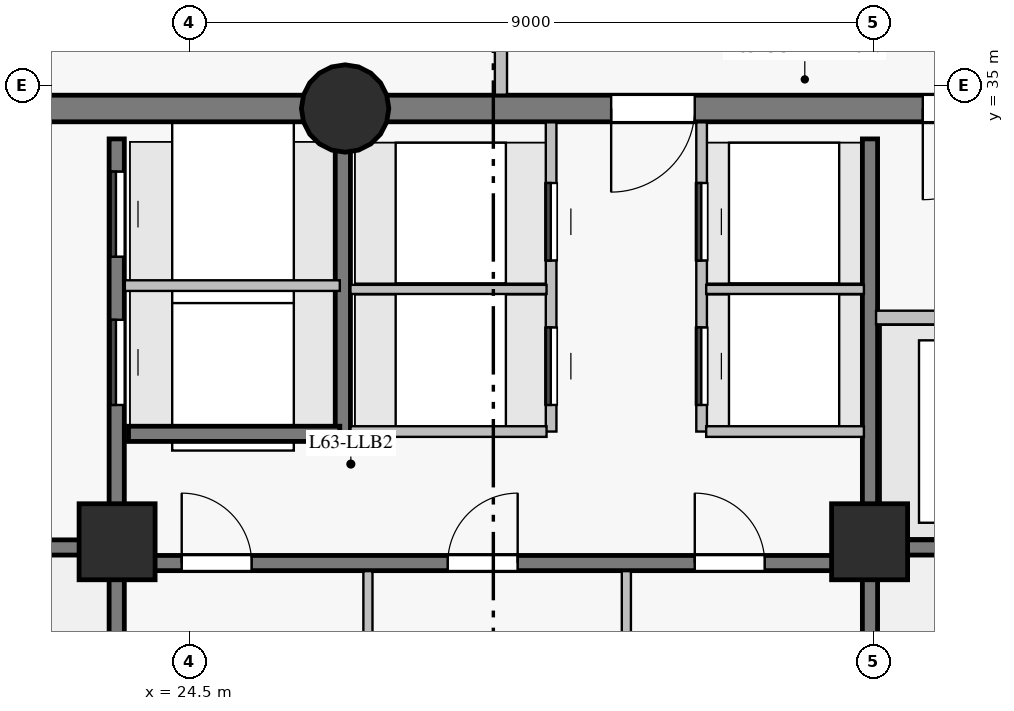
"""IFC4 building model, lengths in metres.
Left out: names, types, materials, properties, quantities, classifications, styles, units other than length and angle.
Written with IfcOpenShell. Run it as: python <this file> out.ifc"""

import sys

from ifc_helpers import new_model, si_unit, direction, frame, frame_2d, origin, origin_with_axes, origin_2d, place, context, subcontext, project, spatial, rectangle, circle, extrude, source, transform, mapped, element, fill, save


model = new_model("IFC4")
c1 = context("Model", 3, precision=1e-05, world=origin(), true_north=direction((0.0, 1.0)))
c2 = subcontext(c1, "Body", "Model", "MODEL_VIEW")
j1 = project(units=[si_unit("LENGTHUNIT", "METRE"), si_unit("PLANEANGLEUNIT", "RADIAN")], contexts=[c1])
p1 = place(None, origin())
s1 = spatial("IfcSite", under=j1, at=p1, CompositionType="ELEMENT")
p2 = place(p1, origin())
s2 = spatial("IfcBuilding", under=s1, at=p2, CompositionType="ELEMENT")
p3 = place(p2, frame((0.0, 0.0, 216.9)))
s3 = spatial("IfcBuildingStorey", under=s2, at=p3, CompositionType="ELEMENT", Elevation=216.9)
p4 = place(p3, frame((37.5, 34.7, 0.0), z_axis=(0.0, 0.0, 1.0), x_axis=(-1.0, 0.0, 0.0)))
e1 = element("IfcWall", 1, at=p4, inside=s3, PredefinedType="SHEAR", context=c2, shape_type="SweptSolid", body=[
    extrude(rectangle(XDim=10.95, YDim=0.35, at=frame_2d((5.475, 0.0))), origin(), (0.0, 0.0, 1.0), 2.85),
])
p5 = place(p4, frame((2.15, 0.0, 0.0)))
e2 = element("IfcOpeningElement", 2, at=p5, cuts=e1, PredefinedType="OPENING", context=c2, shape_type="SweptSolid", body=[
    extrude(rectangle(XDim=1.2, YDim=2.15, at=frame_2d((0.6, 1.075))), frame((0.0, 0.185, 0.0), z_axis=(0.0, -1.0, 0.0), x_axis=(1.0, 0.0, 0.0)), (0.0, 0.0, 1.0), 0.37),
])
p6 = place(p4, frame((6.35, 0.0, 0.0)))
e3 = element("IfcOpeningElement", 3, at=p6, cuts=e1, PredefinedType="OPENING", context=c2, shape_type="SweptSolid", body=[
    extrude(rectangle(XDim=1.1, YDim=2.15, at=frame_2d((0.55, 1.075))), frame((0.0, 0.185, 0.0), z_axis=(0.0, -1.0, 0.0), x_axis=(1.0, 0.0, 0.0)), (0.0, 0.0, 1.0), 0.37),
])
p7 = place(p3, frame((26.55, 34.7, 0.0), z_axis=(0.0, 0.0, 1.0), x_axis=(-1.0, 0.0, 0.0)))
e4 = element("IfcWall", 4, at=p7, inside=s3, PredefinedType="SHEAR", context=c2, shape_type="SweptSolid", body=[
    extrude(rectangle(XDim=7.05, YDim=0.35, at=frame_2d((3.525, 0.0))), origin(), (0.0, 0.0, 1.0), 2.85),
])
m1 = source(origin_with_axes(), c2, "Body", "SweptSolid", [
    extrude(circle(Radius=0.575, at=origin_2d()), origin(), (0.0, 0.0, 1.0), 3.05),
])
p8 = place(p3, frame((26.55, 34.7, 0.0), z_axis=(0.0, 0.0, 1.0), x_axis=(1.0, 0.0, 0.0)))
e5 = element("IfcColumn", 5, at=p8, inside=s3, PredefinedType="COLUMN", context=c2, shape_type="MappedRepresentation", body=[
    mapped(m1, transform((0.0, 0.0, 0.0), scale=1.0)),
])
m2 = source(origin_with_axes(), c2, "Body", "SweptSolid", [
    extrude(rectangle(XDim=1.0, YDim=1.0, at=origin_2d()), origin(), (0.0, 0.0, 1.0), 3.05),
])
for number, where, z_axis, x_axis in (
    (6, (23.55, 29.0, 0.0), (0.0, 0.0, 1.0), (1.0, 0.0, 0.0)),
    (7, (33.45, 29.0, 0.0), (0.0, 0.0, 1.0), (1.0, 0.0, 0.0)),
):
    element("IfcColumn", number, at=place(p3, frame(where, z_axis=z_axis, x_axis=x_axis)), inside=s3, PredefinedType="COLUMN", context=c2, shape_type="MappedRepresentation", body=[
        mapped(m2, transform((0.0, 0.0, 0.0), scale=1.0)),
    ])
p9 = place(p3, frame((23.545, 18.7, 0.0), z_axis=(0.0, 0.0, 1.0), x_axis=(0.0, 1.0, 0.0)))
e8 = element("IfcWall", 8, at=p9, inside=s3, PredefinedType="SHEAR", context=c2, shape_type="SweptSolid", body=[
    extrude(rectangle(XDim=15.6, YDim=0.2, at=frame_2d((7.8, 0.0))), origin(), (0.0, 0.0, 1.0), 2.85),
])
p10 = place(p9, frame((2.75, 0.0, 0.0)))
e9 = element("IfcOpeningElement", 9, at=p10, cuts=e8, PredefinedType="OPENING", context=c2, shape_type="SweptSolid", body=[
    extrude(rectangle(XDim=1.15, YDim=2.15, at=frame_2d((0.575, 1.075))), frame((0.0, 0.11, 0.0), z_axis=(0.0, -1.0, 0.0), x_axis=(1.0, 0.0, 0.0)), (0.0, 0.0, 1.0), 0.22),
])
p11 = place(p9, frame((0.14, 0.0, 0.0)))
e10 = element("IfcOpeningElement", 10, at=p11, cuts=e8, PredefinedType="OPENING", context=c2, shape_type="SweptSolid", body=[
    extrude(rectangle(XDim=0.88, YDim=2.1, at=frame_2d((0.44, 1.05))), frame((0.0, 0.11, 0.0), z_axis=(0.0, -1.0, 0.0), x_axis=(1.0, 0.0, 0.0)), (0.0, 0.0, 1.0), 0.22),
])
p12 = place(p9, frame((1.36, 0.0, 0.0)))
e11 = element("IfcOpeningElement", 11, at=p12, cuts=e8, PredefinedType="OPENING", context=c2, shape_type="SweptSolid", body=[
    extrude(rectangle(XDim=0.88, YDim=2.1, at=frame_2d((0.44, 1.05))), frame((0.0, 0.11, 0.0), z_axis=(0.0, -1.0, 0.0), x_axis=(1.0, 0.0, 0.0)), (0.0, 0.0, 1.0), 0.22),
])
p13 = place(p9, frame((12.1, 0.0, 0.0)))
e12 = element("IfcOpeningElement", 12, at=p13, cuts=e8, PredefinedType="OPENING", context=c2, shape_type="SweptSolid", body=[
    extrude(rectangle(XDim=1.12, YDim=2.15, at=frame_2d((0.56, 1.075))), frame((0.0, 0.11, 0.0), z_axis=(0.0, -1.0, 0.0), x_axis=(1.0, 0.0, 0.0)), (0.0, 0.0, 1.0), 0.22),
])
p14 = place(p9, frame((14.05, 0.0, 0.0)))
e13 = element("IfcOpeningElement", 13, at=p14, cuts=e8, PredefinedType="OPENING", context=c2, shape_type="SweptSolid", body=[
    extrude(rectangle(XDim=1.12, YDim=2.15, at=frame_2d((0.56, 1.075))), frame((0.0, 0.11, 0.0), z_axis=(0.0, -1.0, 0.0), x_axis=(1.0, 0.0, 0.0)), (0.0, 0.0, 1.0), 0.22),
])
p15 = place(p3, frame((33.455, 18.7, 0.0), z_axis=(0.0, 0.0, 1.0), x_axis=(0.0, 1.0, 0.0)))
e14 = element("IfcWall", 14, at=p15, inside=s3, PredefinedType="SHEAR", context=c2, shape_type="SweptSolid", body=[
    extrude(rectangle(XDim=15.6, YDim=0.2, at=frame_2d((7.8, 0.0))), origin(), (0.0, 0.0, 1.0), 2.85),
])
p16 = place(p15, frame((2.75, 0.0, 0.0)))
e15 = element("IfcOpeningElement", 15, at=p16, cuts=e14, PredefinedType="OPENING", context=c2, shape_type="SweptSolid", body=[
    extrude(rectangle(XDim=1.15, YDim=2.15, at=frame_2d((0.575, 1.075))), frame((0.0, 0.11, 0.0), z_axis=(0.0, -1.0, 0.0), x_axis=(1.0, 0.0, 0.0)), (0.0, 0.0, 1.0), 0.22),
])
p17 = place(p15, frame((0.55, 0.0, 0.0)))
e16 = element("IfcOpeningElement", 16, at=p17, cuts=e14, PredefinedType="OPENING", context=c2, shape_type="SweptSolid", body=[
    extrude(rectangle(XDim=0.94, YDim=2.1, at=frame_2d((0.47, 1.05))), frame((0.0, 0.11, 0.0), z_axis=(0.0, -1.0, 0.0), x_axis=(1.0, 0.0, 0.0)), (0.0, 0.0, 1.0), 0.22),
])
p18 = place(p3, frame((23.7, 28.72, 0.0), z_axis=(0.0, 0.0, 1.0), x_axis=(1.0, 0.0, 0.0)))
e17 = element("IfcWall", 17, at=p18, inside=s3, PredefinedType="SHEAR", context=c2, shape_type="SweptSolid", body=[
    extrude(rectangle(XDim=9.6, YDim=0.2, at=frame_2d((4.8, 0.0))), origin(), (0.0, 0.0, 1.0), 2.85),
])
p19 = place(p18, frame((0.7, 0.0, 0.0)))
e18 = element("IfcOpeningElement", 18, at=p19, cuts=e17, PredefinedType="OPENING", context=c2, shape_type="SweptSolid", body=[
    extrude(rectangle(XDim=0.92, YDim=2.1, at=frame_2d((0.46, 1.05))), frame((0.0, 0.11, 0.0), z_axis=(0.0, -1.0, 0.0), x_axis=(1.0, 0.0, 0.0)), (0.0, 0.0, 1.0), 0.22),
])
p20 = place(p18, frame((4.2, 0.0, 0.0)))
e19 = element("IfcOpeningElement", 19, at=p20, cuts=e17, PredefinedType="OPENING", context=c2, shape_type="SweptSolid", body=[
    extrude(rectangle(XDim=0.92, YDim=2.1, at=frame_2d((0.46, 1.05))), frame((0.0, 0.11, 0.0), z_axis=(0.0, -1.0, 0.0), x_axis=(1.0, 0.0, 0.0)), (0.0, 0.0, 1.0), 0.22),
])
p21 = place(p18, frame((7.45, 0.0, 0.0)))
e20 = element("IfcOpeningElement", 20, at=p21, cuts=e17, PredefinedType="OPENING", context=c2, shape_type="SweptSolid", body=[
    extrude(rectangle(XDim=0.92, YDim=2.1, at=frame_2d((0.46, 1.05))), frame((0.0, 0.11, 0.0), z_axis=(0.0, -1.0, 0.0), x_axis=(1.0, 0.0, 0.0)), (0.0, 0.0, 1.0), 0.22),
])
for number, where, z_axis, x_axis in (
    (21, (33.455, 28.925, 0.0), (0.0, 0.0, 1.0), (1.0, 0.0, 0.0)),
    (22, (19.55, 28.925, 0.0), (0.0, 0.0, 1.0), (1.0, 0.0, 0.0)),
):
    element("IfcWall", number, at=place(p3, frame(where, z_axis=z_axis, x_axis=x_axis)), inside=s3, PredefinedType="SHEAR", context=c2, shape_type="SweptSolid", body=[
        extrude(rectangle(XDim=3.995, YDim=0.2, at=frame_2d((1.998, 0.0))), origin(), (0.0, 0.0, 1.0), 2.85),
    ])
p22 = place(p3, frame((26.52, 30.42, 0.0), z_axis=(0.0, 0.0, 1.0), x_axis=(0.0, 1.0, 0.0)))
e23 = element("IfcWall", 23, at=p22, inside=s3, PredefinedType="SHEAR", context=c2, shape_type="SweptSolid", body=[
    extrude(rectangle(XDim=3.86, YDim=0.2, at=frame_2d((1.93, 0.0))), origin(), (0.0, 0.0, 1.0), 2.85),
])
p23 = place(p3, frame((23.7, 30.42, 0.0), z_axis=(0.0, 0.0, 1.0), x_axis=(1.0, 0.0, 0.0)))
e24 = element("IfcWall", 24, at=p23, inside=s3, PredefinedType="SHEAR", context=c2, shape_type="SweptSolid", body=[
    extrude(rectangle(XDim=2.78, YDim=0.2, at=frame_2d((1.39, 0.0))), origin(), (0.0, 0.0, 1.0), 2.85),
])
p24 = place(p3, frame((29.26, 30.45, 0.0), z_axis=(0.0, 0.0, 1.0), x_axis=(0.0, 1.0, 0.0)))
e25 = element("IfcWall", 25, at=p24, inside=s3, PredefinedType="PARTITIONING", context=c2, shape_type="SweptSolid", body=[
    extrude(rectangle(XDim=4.068, YDim=0.14, at=frame_2d((2.034, 0.0))), origin(), (0.0, 0.0, 1.0), 2.85),
])
p25 = place(p24, frame((0.35, 0.0, 0.0)))
e26 = element("IfcOpeningElement", 26, at=p25, cuts=e25, PredefinedType="OPENING", context=c2, shape_type="SweptSolid", body=[
    extrude(rectangle(XDim=1.02, YDim=2.15, at=frame_2d((0.51, 1.075))), frame((0.0, 0.08, 0.0), z_axis=(0.0, -1.0, 0.0), x_axis=(1.0, 0.0, 0.0)), (0.0, 0.0, 1.0), 0.16),
])
p26 = place(p24, frame((2.25, 0.0, 0.0)))
e27 = element("IfcOpeningElement", 27, at=p26, cuts=e25, PredefinedType="OPENING", context=c2, shape_type="SweptSolid", body=[
    extrude(rectangle(XDim=1.02, YDim=2.15, at=frame_2d((0.51, 1.075))), frame((0.0, 0.08, 0.0), z_axis=(0.0, -1.0, 0.0), x_axis=(1.0, 0.0, 0.0)), (0.0, 0.0, 1.0), 0.16),
])
p27 = place(p3, frame((31.24, 30.45, 0.0), z_axis=(0.0, 0.0, 1.0), x_axis=(0.0, 1.0, 0.0)))
e28 = element("IfcWall", 28, at=p27, inside=s3, PredefinedType="PARTITIONING", context=c2, shape_type="SweptSolid", body=[
    extrude(rectangle(XDim=4.068, YDim=0.14, at=frame_2d((2.034, 0.0))), origin(), (0.0, 0.0, 1.0), 2.85),
])
p28 = place(p27, frame((0.35, 0.0, 0.0)))
e29 = element("IfcOpeningElement", 29, at=p28, cuts=e28, PredefinedType="OPENING", context=c2, shape_type="SweptSolid", body=[
    extrude(rectangle(XDim=1.02, YDim=2.15, at=frame_2d((0.51, 1.075))), frame((0.0, 0.08, 0.0), z_axis=(0.0, -1.0, 0.0), x_axis=(1.0, 0.0, 0.0)), (0.0, 0.0, 1.0), 0.16),
])
p29 = place(p27, frame((2.25, 0.0, 0.0)))
e30 = element("IfcOpeningElement", 30, at=p29, cuts=e28, PredefinedType="OPENING", context=c2, shape_type="SweptSolid", body=[
    extrude(rectangle(XDim=1.02, YDim=2.15, at=frame_2d((0.51, 1.075))), frame((0.0, 0.08, 0.0), z_axis=(0.0, -1.0, 0.0), x_axis=(1.0, 0.0, 0.0)), (0.0, 0.0, 1.0), 0.16),
])
p30 = place(p3, frame((33.535, 31.95, 0.0), z_axis=(0.0, 0.0, 1.0), x_axis=(1.0, 0.0, 0.0)))
e31 = element("IfcWall", 31, at=p30, inside=s3, PredefinedType="PARTITIONING", context=c2, shape_type="SweptSolid", body=[
    extrude(rectangle(XDim=3.784, YDim=0.18, at=frame_2d((1.892, 0.0))), origin(), (0.0, 0.0, 1.0), 2.85),
])
p31 = place(p30, frame((0.9, 0.0, 0.0)))
e32 = element("IfcOpeningElement", 32, at=p31, cuts=e31, PredefinedType="OPENING", context=c2, shape_type="SweptSolid", body=[
    extrude(rectangle(XDim=1.3, YDim=2.2, at=frame_2d((0.65, 1.1))), frame((0.0, 0.1, 0.0), z_axis=(0.0, -1.0, 0.0), x_axis=(1.0, 0.0, 0.0)), (0.0, 0.0, 1.0), 0.2),
])
p32 = place(p3, frame((23.652, 32.37, 0.0), z_axis=(0.0, 0.0, 1.0), x_axis=(1.0, 0.0, 0.0)))
e33 = element("IfcWall", 33, at=p32, inside=s3, PredefinedType="PARTITIONING", context=c2, shape_type="SweptSolid", body=[
    extrude(rectangle(XDim=2.828, YDim=0.14, at=frame_2d((1.414, 0.0))), origin(), (0.0, 0.0, 1.0), 2.85),
])
p33 = place(p3, frame((26.62, 30.45, 0.0), z_axis=(0.0, 0.0, 1.0), x_axis=(1.0, 0.0, 0.0)))
e34 = element("IfcWall", 34, at=p33, inside=s3, PredefinedType="PARTITIONING", context=c2, shape_type="SweptSolid", body=[
    extrude(rectangle(XDim=2.58, YDim=0.14, at=frame_2d((1.29, 0.0))), origin(), (0.0, 0.0, 1.0), 2.85),
])
p34 = place(p3, frame((26.62, 32.32, 0.0), z_axis=(0.0, 0.0, 1.0), x_axis=(1.0, 0.0, 0.0)))
e35 = element("IfcWall", 35, at=p34, inside=s3, PredefinedType="PARTITIONING", context=c2, shape_type="SweptSolid", body=[
    extrude(rectangle(XDim=2.58, YDim=0.12, at=frame_2d((1.29, 0.0))), origin(), (0.0, 0.0, 1.0), 2.85),
])
for number, where, z_axis, x_axis in (
    (36, (26.85, 26.027, 0.0), (0.0, 0.0, 1.0), (0.0, 1.0, 0.0)),
    (37, (30.25, 26.027, 0.0), (0.0, 0.0, 1.0), (0.0, 1.0, 0.0)),
):
    element("IfcWall", number, at=place(p3, frame(where, z_axis=z_axis, x_axis=x_axis)), inside=s3, PredefinedType="PARTITIONING", context=c2, shape_type="SweptSolid", body=[
        extrude(rectangle(XDim=2.587, YDim=0.12, at=frame_2d((1.293, 0.0))), origin(), (0.0, 0.0, 1.0), 2.85),
    ])
p35 = place(p3, frame((31.3, 30.45, 0.0), z_axis=(0.0, 0.0, 1.0), x_axis=(1.0, 0.0, 0.0)))
e38 = element("IfcWall", 38, at=p35, inside=s3, PredefinedType="PARTITIONING", context=c2, shape_type="SweptSolid", body=[
    extrude(rectangle(XDim=2.075, YDim=0.14, at=frame_2d((1.038, 0.0))), origin(), (0.0, 0.0, 1.0), 2.85),
])
p36 = place(p3, frame((31.3, 32.32, 0.0), z_axis=(0.0, 0.0, 1.0), x_axis=(1.0, 0.0, 0.0)))
e39 = element("IfcWall", 39, at=p36, inside=s3, PredefinedType="PARTITIONING", context=c2, shape_type="SweptSolid", body=[
    extrude(rectangle(XDim=2.075, YDim=0.12, at=frame_2d((1.038, 0.0))), origin(), (0.0, 0.0, 1.0), 2.85),
])
p37 = place(p3, frame((28.6, 34.882, 0.0), z_axis=(0.0, 0.0, 1.0), x_axis=(0.0, 1.0, 0.0)))
e40 = element("IfcWall", 40, at=p37, inside=s3, PredefinedType="PARTITIONING", context=c2, shape_type="SweptSolid", body=[
    extrude(rectangle(XDim=1.518, YDim=0.16, at=frame_2d((0.759, 0.0))), origin(), (0.0, 0.0, 1.0), 2.85),
])
m3 = source(origin_with_axes(), c2, "Body", "SweptSolid", [
    extrude(rectangle(XDim=1.2, YDim=2.15, at=frame_2d((0.6, 1.075))), frame((0.0, 0.025, 0.0), z_axis=(0.0, -1.0, 0.0), x_axis=(1.0, 0.0, 0.0)), (0.0, 0.0, 1.0), 0.05),
])
p38 = place(p5, origin())
e41 = element("IfcDoor", 41, at=p38, inside=s3, OperationType="SINGLE_SWING_RIGHT", PredefinedType="DOOR", context=c2, shape_type="MappedRepresentation", body=[
    mapped(m3, transform((0.0, 0.0, 0.0), scale=1.0)),
])
fill(e2, e41)
m4 = source(origin_with_axes(), c2, "Body", "SweptSolid", [
    extrude(rectangle(XDim=0.92, YDim=2.1, at=frame_2d((0.46, 1.05))), frame((0.0, 0.025, 0.0), z_axis=(0.0, -1.0, 0.0), x_axis=(1.0, 0.0, 0.0)), (0.0, 0.0, 1.0), 0.05),
])
p39 = place(p19, origin())
e42 = element("IfcDoor", 42, at=p39, inside=s3, OperationType="SINGLE_SWING_LEFT", PredefinedType="DOOR", context=c2, shape_type="MappedRepresentation", body=[
    mapped(m4, transform((0.0, 0.0, 0.0), scale=1.0)),
])
fill(e18, e42)
p40 = place(p20, origin())
e43 = element("IfcDoor", 43, at=p40, inside=s3, OperationType="SINGLE_SWING_RIGHT", PredefinedType="DOOR", context=c2, shape_type="MappedRepresentation", body=[
    mapped(m4, transform((0.0, 0.0, 0.0), scale=1.0)),
])
fill(e19, e43)
p41 = place(p21, origin())
e44 = element("IfcDoor", 44, at=p41, inside=s3, OperationType="SINGLE_SWING_LEFT", PredefinedType="DOOR", context=c2, shape_type="MappedRepresentation", body=[
    mapped(m4, transform((0.0, 0.0, 0.0), scale=1.0)),
])
fill(e20, e44)
m5 = source(origin_with_axes(), c2, "Body", "SweptSolid", [
    extrude(rectangle(XDim=1.1, YDim=2.15, at=frame_2d((0.55, 1.075))), frame((0.0, 0.025, 0.0), z_axis=(0.0, -1.0, 0.0), x_axis=(1.0, 0.0, 0.0)), (0.0, 0.0, 1.0), 0.05),
])
p42 = place(p6, origin())
e45 = element("IfcDoor", 45, at=p42, inside=s3, OperationType="SINGLE_SWING_RIGHT", PredefinedType="DOOR", context=c2, shape_type="MappedRepresentation", body=[
    mapped(m5, transform((0.0, 0.0, 0.0), scale=1.0)),
])
fill(e3, e45)
m6 = source(origin_with_axes(), c2, "Body", "SweptSolid", [
    extrude(rectangle(XDim=1.12, YDim=2.15, at=frame_2d((0.56, 1.075))), frame((0.0, 0.025, 0.0), z_axis=(0.0, -1.0, 0.0), x_axis=(1.0, 0.0, 0.0)), (0.0, 0.0, 1.0), 0.05),
])
p43 = place(p13, origin())
e46 = element("IfcDoor", 46, at=p43, inside=s3, OperationType="SLIDING_TO_LEFT", PredefinedType="DOOR", context=c2, shape_type="MappedRepresentation", body=[
    mapped(m6, transform((0.0, 0.0, 0.0), scale=1.0)),
])
fill(e12, e46)
p44 = place(p14, origin())
e47 = element("IfcDoor", 47, at=p44, inside=s3, OperationType="SLIDING_TO_RIGHT", PredefinedType="DOOR", context=c2, shape_type="MappedRepresentation", body=[
    mapped(m6, transform((0.0, 0.0, 0.0), scale=1.0)),
])
fill(e13, e47)
m7 = source(origin_with_axes(), c2, "Body", "SweptSolid", [
    extrude(rectangle(XDim=1.02, YDim=2.15, at=frame_2d((0.51, 1.075))), frame((0.0, 0.025, 0.0), z_axis=(0.0, -1.0, 0.0), x_axis=(1.0, 0.0, 0.0)), (0.0, 0.0, 1.0), 0.05),
])
p45 = place(p25, origin())
e48 = element("IfcDoor", 48, at=p45, inside=s3, OperationType="SLIDING_TO_LEFT", PredefinedType="DOOR", context=c2, shape_type="MappedRepresentation", body=[
    mapped(m7, transform((0.0, 0.0, 0.0), scale=1.0)),
])
fill(e26, e48)
p46 = place(p26, origin())
e49 = element("IfcDoor", 49, at=p46, inside=s3, OperationType="SLIDING_TO_LEFT", PredefinedType="DOOR", context=c2, shape_type="MappedRepresentation", body=[
    mapped(m7, transform((0.0, 0.0, 0.0), scale=1.0)),
])
fill(e27, e49)
p47 = place(p28, origin())
e50 = element("IfcDoor", 50, at=p47, inside=s3, OperationType="SLIDING_TO_LEFT", PredefinedType="DOOR", context=c2, shape_type="MappedRepresentation", body=[
    mapped(m7, transform((0.0, 0.0, 0.0), scale=1.0)),
])
fill(e29, e50)
p48 = place(p29, origin())
e51 = element("IfcDoor", 51, at=p48, inside=s3, OperationType="SLIDING_TO_LEFT", PredefinedType="DOOR", context=c2, shape_type="MappedRepresentation", body=[
    mapped(m7, transform((0.0, 0.0, 0.0), scale=1.0)),
])
fill(e30, e51)
save(model, sys.argv[1])
